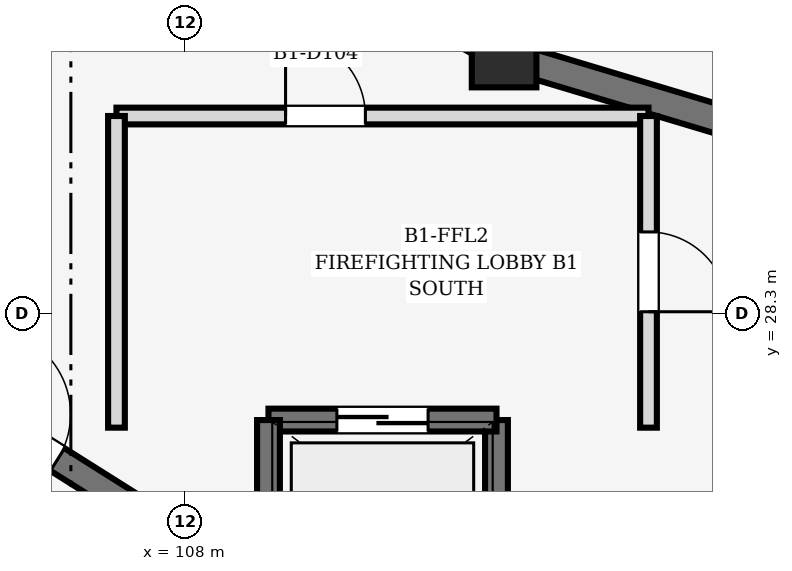
"""IFC4 building model, lengths in metres.
Left out: names, types, materials, properties, quantities, classifications, styles, units other than length and angle.
Written with IfcOpenShell. Run it as: python <this file> out.ifc"""

import sys

from ifc_helpers import new_model, si_unit, direction, frame, frame_2d, origin, origin_2d, place, context, subcontext, project, spatial, rectangle, extrude, element, fill, save


model = new_model("IFC4")
c1 = context("Model", 3, precision=1e-05, world=origin(), true_north=direction((0.0, 1.0)))
c2 = subcontext(c1, "Body", "Model", "MODEL_VIEW")
j1 = project(units=[si_unit("LENGTHUNIT", "METRE"), si_unit("PLANEANGLEUNIT", "RADIAN")], contexts=[c1])
p1 = place(None, origin())
s1 = spatial("IfcSite", under=j1, at=p1, CompositionType="ELEMENT")
p2 = place(p1, origin())
s2 = spatial("IfcBuilding", under=s1, at=p2, CompositionType="ELEMENT")
p3 = place(p2, frame((0.0, 0.0, -4.8)))
s3 = spatial("IfcBuildingStorey", under=s2, at=p3, CompositionType="ELEMENT", Elevation=-4.8)
p4 = place(p3, frame((112.2, 31.702, 0.0), z_axis=(0.0, 0.0, 1.0), x_axis=(1.0, 0.0, 0.0)))
e1 = element("IfcColumn", 1, at=p4, inside=s3, PredefinedType="COLUMN", context=c2, shape_type="SweptSolid", body=[
    extrude(rectangle(XDim=0.85, YDim=0.85, at=origin_2d()), origin(), (0.0, 0.0, 1.0), 4.8),
])
p5 = place(p3, frame((108.281, 33.881, 0.0), z_axis=(0.0, 0.0, 1.0), x_axis=(0.874014845015, -0.485899218659, 0.0)))
e2 = element("IfcWall", 2, at=p5, inside=s3, PredefinedType="SOLIDWALL", context=c2, shape_type="SweptSolid", body=[
    extrude(rectangle(XDim=4.125, YDim=0.38, at=frame_2d((2.062, 0.0))), origin(), (0.0, 0.0, 1.0), 4.48),
])
p6 = place(p5, frame((1.532, 0.0, 0.0)))
e3 = element("IfcOpeningElement", 3, at=p6, cuts=e2, PredefinedType="OPENING", context=c2, shape_type="SweptSolid", body=[
    extrude(rectangle(XDim=1.06, YDim=2.24, at=frame_2d((0.53, 1.12))), frame((0.0, 0.202, 0.0), z_axis=(0.0, -1.0, 0.0), x_axis=(1.0, 0.0, 0.0)), (0.0, 0.0, 1.0), 0.404),
])
p7 = place(p3, frame((103.354, 28.252, 0.0), z_axis=(0.0, 0.0, 1.0), x_axis=(0.846151979506, -0.532941673712, 0.0)))
e4 = element("IfcWall", 4, at=p7, inside=s3, PredefinedType="SHEAR", context=c2, shape_type="SweptSolid", body=[
    extrude(rectangle(XDim=5.9, YDim=0.35, at=frame_2d((2.95, 0.0))), origin(), (0.0, 0.0, 1.0), 4.48),
])
p8 = place(p7, frame((2.39, 0.0, 0.0)))
e5 = element("IfcOpeningElement", 5, at=p8, cuts=e4, PredefinedType="OPENING", context=c2, shape_type="SweptSolid", body=[
    extrude(rectangle(XDim=1.12, YDim=2.26, at=frame_2d((0.56, 1.13))), frame((0.0, 0.187, 0.0), z_axis=(0.0, -1.0, 0.0), x_axis=(1.0, 0.0, 0.0)), (0.0, 0.0, 1.0), 0.374),
])
p9 = place(p3, frame((112.545, 31.599, 0.0), z_axis=(0.0, 0.0, 1.0), x_axis=(0.95780895372, -0.287405650907, 0.0)))
e6 = element("IfcWall", 6, at=p9, inside=s3, PredefinedType="SOLIDWALL", context=c2, shape_type="SweptSolid", body=[
    extrude(rectangle(XDim=4.265, YDim=0.38, at=frame_2d((2.133, 0.0))), origin(), (0.0, 0.0, 1.0), 4.48),
])
p10 = place(p3, frame((112.1, 26.9, 0.0), z_axis=(0.0, 0.0, 1.0), x_axis=(0.0, -1.0, 0.0)))
e7 = element("IfcWall", 7, at=p10, inside=s3, PredefinedType="SHEAR", context=c2, shape_type="SweptSolid", body=[
    extrude(rectangle(XDim=2.2, YDim=0.3, at=frame_2d((1.1, 0.0))), origin(), (0.0, 0.0, 1.0), 4.5),
])
p11 = place(p3, frame((109.1, 26.9, 0.0), z_axis=(0.0, 0.0, 1.0), x_axis=(1.0, 0.0, 0.0)))
e8 = element("IfcWall", 8, at=p11, inside=s3, PredefinedType="SHEAR", context=c2, shape_type="SweptSolid", body=[
    extrude(rectangle(XDim=3.0, YDim=0.3, at=frame_2d((1.5, 0.0))), origin(), (0.0, 0.0, 1.0), 4.5),
])
p12 = place(p11, frame((0.9, 0.0, 0.0)))
e9 = element("IfcOpeningElement", 9, at=p12, cuts=e8, PredefinedType="OPENING", context=c2, shape_type="SweptSolid", body=[
    extrude(rectangle(XDim=1.2, YDim=2.15, at=frame_2d((0.6, 1.075))), frame((0.0, 0.162, 0.0), z_axis=(0.0, -1.0, 0.0), x_axis=(1.0, 0.0, 0.0)), (0.0, 0.0, 1.0), 0.324),
])
p13 = place(p3, frame((109.1, 24.7, 0.0), z_axis=(0.0, 0.0, 1.0), x_axis=(0.0, 1.0, 0.0)))
e10 = element("IfcWall", 10, at=p13, inside=s3, PredefinedType="SHEAR", context=c2, shape_type="SweptSolid", body=[
    extrude(rectangle(XDim=2.2, YDim=0.3, at=frame_2d((1.1, 0.0))), origin(), (0.0, 0.0, 1.0), 4.48),
])
p14 = place(p3, frame((107.1, 30.9, 0.0), z_axis=(0.0, 0.0, 1.0), x_axis=(1.0, 0.0, 0.0)))
e11 = element("IfcWall", 11, at=p14, inside=s3, PredefinedType="SOLIDWALL", context=c2, shape_type="SweptSolid", body=[
    extrude(rectangle(XDim=7.0, YDim=0.22, at=frame_2d((3.5, 0.0))), origin(), (0.0, 0.0, 1.0), 4.485),
])
p15 = place(p14, frame((2.225, 0.0, 0.0)))
e12 = element("IfcOpeningElement", 12, at=p15, cuts=e11, PredefinedType="OPENING", context=c2, shape_type="SweptSolid", body=[
    extrude(rectangle(XDim=1.05, YDim=2.15, at=frame_2d((0.525, 1.075))), frame((0.0, 0.122, 0.0), z_axis=(0.0, -1.0, 0.0), x_axis=(1.0, 0.0, 0.0)), (0.0, 0.0, 1.0), 0.244),
])
p16 = place(p3, frame((107.1, 26.8, 0.0), z_axis=(0.0, 0.0, 1.0), x_axis=(0.0, 1.0, 0.0)))
e13 = element("IfcWall", 13, at=p16, inside=s3, PredefinedType="SOLIDWALL", context=c2, shape_type="SweptSolid", body=[
    extrude(rectangle(XDim=4.1, YDim=0.22, at=frame_2d((2.05, 0.0))), origin(), (0.0, 0.0, 1.0), 4.485),
])
p17 = place(p3, frame((114.1, 30.9, 0.0), z_axis=(0.0, 0.0, 1.0), x_axis=(0.0, -1.0, 0.0)))
e14 = element("IfcWall", 14, at=p17, inside=s3, PredefinedType="SOLIDWALL", context=c2, shape_type="SweptSolid", body=[
    extrude(rectangle(XDim=4.1, YDim=0.22, at=frame_2d((2.05, 0.0))), origin(), (0.0, 0.0, 1.0), 4.485),
])
p18 = place(p17, frame((1.525, 0.0, 0.0)))
e15 = element("IfcOpeningElement", 15, at=p18, cuts=e14, PredefinedType="OPENING", context=c2, shape_type="SweptSolid", body=[
    extrude(rectangle(XDim=1.05, YDim=2.15, at=frame_2d((0.525, 1.075))), frame((0.0, 0.122, 0.0), z_axis=(0.0, -1.0, 0.0), x_axis=(1.0, 0.0, 0.0)), (0.0, 0.0, 1.0), 0.244),
])
p19 = place(p12, origin())
e16 = element("IfcDoor", 16, at=p19, inside=s3, OperationType="DOUBLE_DOOR_SLIDING", PredefinedType="DOOR", context=c2, shape_type="SweptSolid", body=[
    extrude(rectangle(XDim=1.2, YDim=2.15, at=frame_2d((0.6, 1.075))), frame((0.0, 0.025, 0.0), z_axis=(0.0, -1.0, 0.0), x_axis=(1.0, 0.0, 0.0)), (0.0, 0.0, 1.0), 0.05),
])
fill(e9, e16)
p20 = place(p15, origin())
e17 = element("IfcDoor", 17, at=p20, inside=s3, OperationType="SINGLE_SWING_LEFT", PredefinedType="DOOR", context=c2, shape_type="SweptSolid", body=[
    extrude(rectangle(XDim=1.05, YDim=2.15, at=frame_2d((0.525, 1.075))), frame((0.0, 0.025, 0.0), z_axis=(0.0, -1.0, 0.0), x_axis=(1.0, 0.0, 0.0)), (0.0, 0.0, 1.0), 0.05),
])
fill(e12, e17)
p21 = place(p18, origin())
e18 = element("IfcDoor", 18, at=p21, inside=s3, OperationType="SINGLE_SWING_RIGHT", PredefinedType="DOOR", context=c2, shape_type="SweptSolid", body=[
    extrude(rectangle(XDim=1.05, YDim=2.15, at=frame_2d((0.525, 1.075))), frame((0.0, 0.025, 0.0), z_axis=(0.0, -1.0, 0.0), x_axis=(1.0, 0.0, 0.0)), (0.0, 0.0, 1.0), 0.05),
])
fill(e15, e18)
p22 = place(p8, origin())
e19 = element("IfcDoor", 19, at=p22, inside=s3, OperationType="SINGLE_SWING_LEFT", PredefinedType="DOOR", context=c2, shape_type="SweptSolid", body=[
    extrude(rectangle(XDim=1.12, YDim=2.26, at=frame_2d((0.56, 1.13))), frame((0.0, 0.025, 0.0), z_axis=(0.0, -1.0, 0.0), x_axis=(1.0, 0.0, 0.0)), (0.0, 0.0, 1.0), 0.05),
])
fill(e5, e19)
save(model, sys.argv[1])
